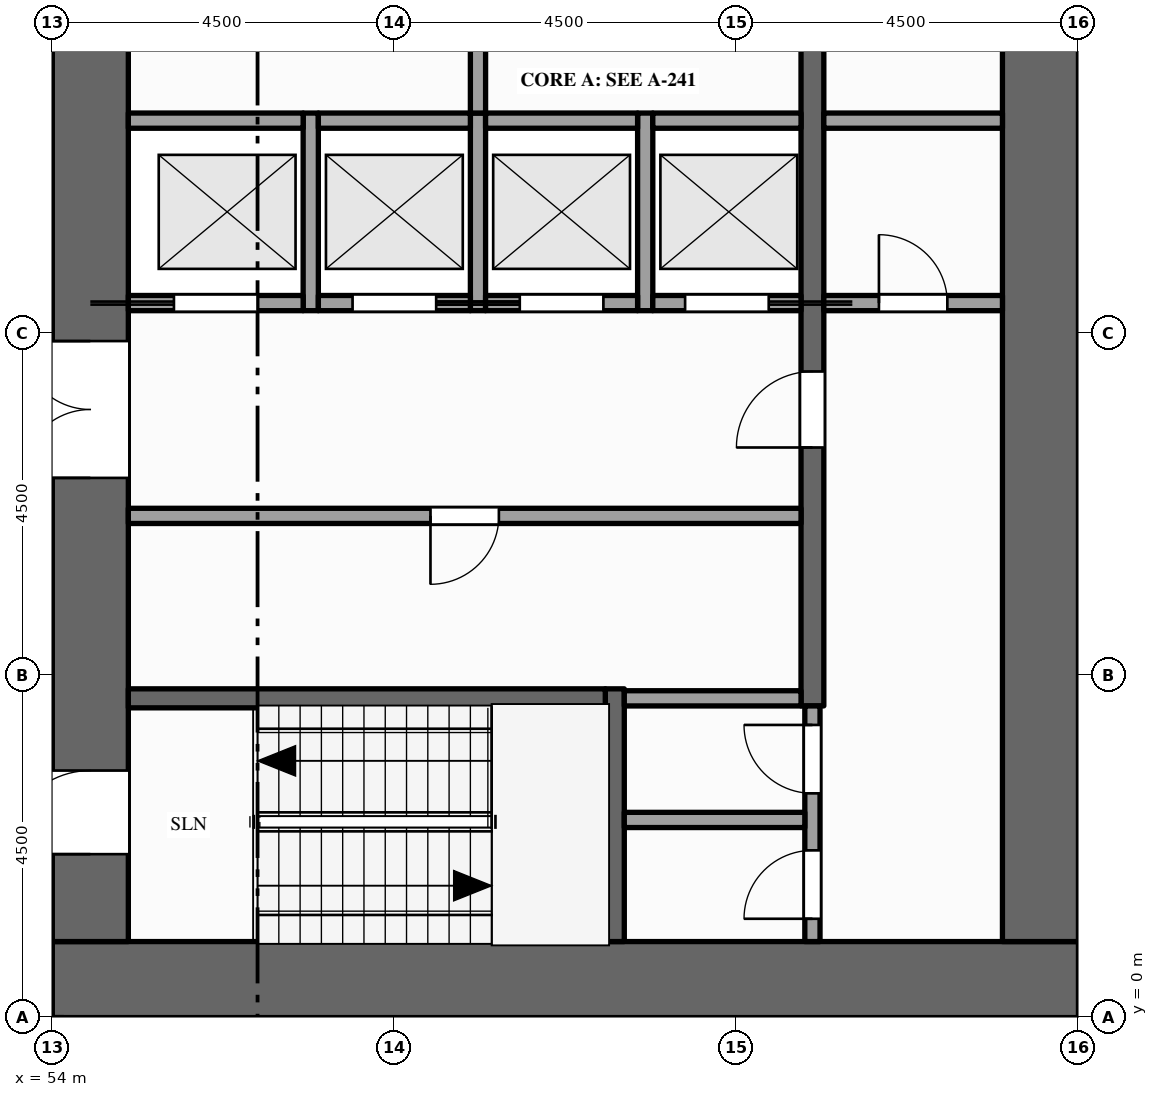
"""IFC4 building model, lengths in metres.
Left out: names, types, materials, properties, quantities, classifications, styles, units other than length and angle.
Written with IfcOpenShell. Run it as: python <this file> out.ifc"""

import sys

from ifc_helpers import new_model, si_unit, direction, frame, frame_2d, origin, place, context, subcontext, project, spatial, rectangle, extrude, element, fill, save


model = new_model("IFC4")
c1 = context("Model", 3, precision=1e-05, world=origin(), true_north=direction((0.0, 1.0)))
c2 = subcontext(c1, "Body", "Model", "MODEL_VIEW")
j1 = project(units=[si_unit("LENGTHUNIT", "METRE"), si_unit("PLANEANGLEUNIT", "RADIAN")], contexts=[c1])
p1 = place(None, origin())
s1 = spatial("IfcSite", under=j1, at=p1, CompositionType="ELEMENT")
p2 = place(p1, origin())
s2 = spatial("IfcBuilding", under=s1, at=p2, CompositionType="ELEMENT")
p3 = place(p2, frame((0.0, 0.0, 227.0)))
s3 = spatial("IfcBuildingStorey", under=s2, at=p3, CompositionType="ELEMENT", Elevation=227.0)
p4 = place(p3, frame((67.5, 0.5, -0.15), z_axis=(0.0, 0.0, 1.0), x_axis=(-1.0, 0.0, 0.0)))
e1 = element("IfcWall", 1, at=p4, inside=s3, PredefinedType="SHEAR", context=c2, shape_type="SweptSolid", body=[
    extrude(rectangle(XDim=13.5, YDim=1.0, at=frame_2d((6.75, 0.0))), origin(), (0.0, 0.0, 1.0), 4.0),
])
p5 = place(p3, frame((54.5, 1.0, -0.15), z_axis=(0.0, 0.0, 1.0), x_axis=(0.0, 1.0, 0.0)))
e2 = element("IfcWall", 2, at=p5, inside=s3, PredefinedType="SHEAR", context=c2, shape_type="SweptSolid", body=[
    extrude(rectangle(XDim=20.5, YDim=1.0, at=frame_2d((10.25, 0.0))), origin(), (0.0, 0.0, 1.0), 4.0),
])
p6 = place(p5, frame((6.1, 0.0, 0.15)))
e3 = element("IfcOpeningElement", 3, at=p6, cuts=e2, PredefinedType="OPENING", context=c2, shape_type="SweptSolid", body=[
    extrude(rectangle(XDim=1.8, YDim=2.1, at=frame_2d((0.9, 1.05))), frame((0.0, 0.51, 0.0), z_axis=(0.0, -1.0, 0.0), x_axis=(1.0, 0.0, 0.0)), (0.0, 0.0, 1.0), 1.02),
])
p7 = place(p5, frame((12.15, 0.0, 0.15)))
e4 = element("IfcOpeningElement", 4, at=p7, cuts=e2, PredefinedType="OPENING", context=c2, shape_type="SweptSolid", body=[
    extrude(rectangle(XDim=1.1, YDim=2.1, at=frame_2d((0.55, 1.05))), frame((0.0, 0.51, 0.0), z_axis=(0.0, -1.0, 0.0), x_axis=(1.0, 0.0, 0.0)), (0.0, 0.0, 1.0), 1.02),
])
p8 = place(p5, frame((1.15, 0.0, 0.15)))
e5 = element("IfcOpeningElement", 5, at=p8, cuts=e2, PredefinedType="OPENING", context=c2, shape_type="SweptSolid", body=[
    extrude(rectangle(XDim=1.1, YDim=2.1, at=frame_2d((0.55, 1.05))), frame((0.0, 0.51, 0.0), z_axis=(0.0, -1.0, 0.0), x_axis=(1.0, 0.0, 0.0)), (0.0, 0.0, 1.0), 1.02),
])
p9 = place(p5, frame((18.35, 0.0, 0.15)))
e6 = element("IfcOpeningElement", 6, at=p9, cuts=e2, PredefinedType="OPENING", context=c2, shape_type="SweptSolid", body=[
    extrude(rectangle(XDim=1.1, YDim=2.1, at=frame_2d((0.55, 1.05))), frame((0.0, 0.51, 0.0), z_axis=(0.0, -1.0, 0.0), x_axis=(1.0, 0.0, 0.0)), (0.0, 0.0, 1.0), 1.02),
])
p10 = place(p3, frame((67.0, 1.0, -0.15), z_axis=(0.0, 0.0, 1.0), x_axis=(0.0, 1.0, 0.0)))
e7 = element("IfcWall", 7, at=p10, inside=s3, PredefinedType="SHEAR", context=c2, shape_type="SweptSolid", body=[
    extrude(rectangle(XDim=20.5, YDim=1.0, at=frame_2d((10.25, 0.0))), origin(), (0.0, 0.0, 1.0), 4.0),
])
for number, where, z_axis, x_axis in (
    (8, (57.4, 9.3, 0.0), (0.0, 0.0, 1.0), (0.0, 1.0, 0.0)),
    (9, (59.6, 9.3, 0.0), (0.0, 0.0, 1.0), (0.0, 1.0, 0.0)),
):
    element("IfcWall", number, at=place(p3, frame(where, z_axis=z_axis, x_axis=x_axis)), inside=s3, PredefinedType="SOLIDWALL", context=c2, shape_type="SweptSolid", body=[
        extrude(rectangle(XDim=2.6, YDim=0.2, at=frame_2d((1.3, 0.0))), origin(), (0.0, 0.0, 1.0), 3.85),
    ])
p11 = place(p3, frame((59.6, 11.9, 0.0), z_axis=(0.0, 0.0, 1.0), x_axis=(0.0, 1.0, 0.0)))
e10 = element("IfcWall", 10, at=p11, inside=s3, PredefinedType="PARTITIONING", context=c2, shape_type="SweptSolid", body=[
    extrude(rectangle(XDim=3.6, YDim=0.2, at=frame_2d((1.8, 0.0))), origin(), (0.0, 0.0, 1.0), 3.85),
])
p12 = place(p11, frame((1.3, 0.0, 0.0)))
e11 = element("IfcOpeningElement", 11, at=p12, cuts=e10, PredefinedType="OPENING", context=c2, shape_type="SweptSolid", body=[
    extrude(rectangle(XDim=1.0, YDim=2.1, at=frame_2d((0.5, 1.05))), frame((0.0, 0.11, 0.0), z_axis=(0.0, -1.0, 0.0), x_axis=(1.0, 0.0, 0.0)), (0.0, 0.0, 1.0), 0.22),
])
p13 = place(p3, frame((61.4, 1.0, 0.0), z_axis=(0.0, 0.0, 1.0), x_axis=(0.0, 1.0, 0.0)))
e12 = element("IfcWall", 12, at=p13, inside=s3, PredefinedType="SHEAR", context=c2, shape_type="SweptSolid", body=[
    extrude(rectangle(XDim=3.325, YDim=0.25, at=frame_2d((1.663, 0.0))), origin(), (0.0, 0.0, 1.0), 3.85),
])
p14 = place(p3, frame((61.8, 9.3, 0.0), z_axis=(0.0, 0.0, 1.0), x_axis=(0.0, 1.0, 0.0)))
e13 = element("IfcWall", 13, at=p14, inside=s3, PredefinedType="SOLIDWALL", context=c2, shape_type="SweptSolid", body=[
    extrude(rectangle(XDim=2.6, YDim=0.2, at=frame_2d((1.3, 0.0))), origin(), (0.0, 0.0, 1.0), 3.85),
])
p15 = place(p3, frame((64.0, 1.0, 0.0), z_axis=(0.0, 0.0, 1.0), x_axis=(0.0, 1.0, 0.0)))
e14 = element("IfcWall", 14, at=p15, inside=s3, PredefinedType="PARTITIONING", context=c2, shape_type="SweptSolid", body=[
    extrude(rectangle(XDim=3.1, YDim=0.2, at=frame_2d((1.55, 0.0))), origin(), (0.0, 0.0, 1.0), 3.85),
])
p16 = place(p15, frame((0.3, 0.0, 0.0)))
e15 = element("IfcOpeningElement", 15, at=p16, cuts=e14, PredefinedType="OPENING", context=c2, shape_type="SweptSolid", body=[
    extrude(rectangle(XDim=0.9, YDim=2.1, at=frame_2d((0.45, 1.05))), frame((0.0, 0.11, 0.0), z_axis=(0.0, -1.0, 0.0), x_axis=(1.0, 0.0, 0.0)), (0.0, 0.0, 1.0), 0.22),
])
p17 = place(p15, frame((1.95, 0.0, 0.0)))
e16 = element("IfcOpeningElement", 16, at=p17, cuts=e14, PredefinedType="OPENING", context=c2, shape_type="SweptSolid", body=[
    extrude(rectangle(XDim=0.9, YDim=2.1, at=frame_2d((0.45, 1.05))), frame((0.0, 0.11, 0.0), z_axis=(0.0, -1.0, 0.0), x_axis=(1.0, 0.0, 0.0)), (0.0, 0.0, 1.0), 0.22),
])
p18 = place(p3, frame((64.0, 4.1, 0.0), z_axis=(0.0, 0.0, 1.0), x_axis=(0.0, 1.0, 0.0)))
e17 = element("IfcWall", 17, at=p18, inside=s3, PredefinedType="SHEAR", context=c2, shape_type="SweptSolid", body=[
    extrude(rectangle(XDim=14.5, YDim=0.3, at=frame_2d((7.25, 0.0))), origin(), (0.0, 0.0, 1.0), 3.85),
])
p19 = place(p18, frame((3.4, 0.0, 0.0)))
e18 = element("IfcOpeningElement", 18, at=p19, cuts=e17, PredefinedType="OPENING", context=c2, shape_type="SweptSolid", body=[
    extrude(rectangle(XDim=1.0, YDim=2.1, at=frame_2d((0.5, 1.05))), frame((0.0, 0.16, 0.0), z_axis=(0.0, -1.0, 0.0), x_axis=(1.0, 0.0, 0.0)), (0.0, 0.0, 1.0), 0.32),
])
p20 = place(p18, frame((9.1, 0.0, 0.0)))
e19 = element("IfcOpeningElement", 19, at=p20, cuts=e17, PredefinedType="OPENING", context=c2, shape_type="SweptSolid", body=[
    extrude(rectangle(XDim=1.0, YDim=2.1, at=frame_2d((0.5, 1.05))), frame((0.0, 0.16, 0.0), z_axis=(0.0, -1.0, 0.0), x_axis=(1.0, 0.0, 0.0)), (0.0, 0.0, 1.0), 0.32),
])
p21 = place(p3, frame((61.525, 2.6, 0.0), z_axis=(0.0, 0.0, 1.0), x_axis=(1.0, 0.0, 0.0)))
e20 = element("IfcWall", 20, at=p21, inside=s3, PredefinedType="PARTITIONING", context=c2, shape_type="SweptSolid", body=[
    extrude(rectangle(XDim=2.375, YDim=0.2, at=frame_2d((1.188, 0.0))), origin(), (0.0, 0.0, 1.0), 3.85),
])
p22 = place(p3, frame((55.0, 4.2, 0.0), z_axis=(0.0, 0.0, 1.0), x_axis=(1.0, 0.0, 0.0)))
e21 = element("IfcWall", 21, at=p22, inside=s3, PredefinedType="SHEAR", context=c2, shape_type="SweptSolid", body=[
    extrude(rectangle(XDim=6.275, YDim=0.25, at=frame_2d((3.137, 0.0))), origin(), (0.0, 0.0, 1.0), 3.85),
])
p23 = place(p3, frame((61.525, 4.2, 0.0), z_axis=(0.0, 0.0, 1.0), x_axis=(1.0, 0.0, 0.0)))
e22 = element("IfcWall", 22, at=p23, inside=s3, PredefinedType="PARTITIONING", context=c2, shape_type="SweptSolid", body=[
    extrude(rectangle(XDim=2.325, YDim=0.2, at=frame_2d((1.163, 0.0))), origin(), (0.0, 0.0, 1.0), 3.85),
])
p24 = place(p3, frame((55.0, 6.6, 0.0), z_axis=(0.0, 0.0, 1.0), x_axis=(1.0, 0.0, 0.0)))
e23 = element("IfcWall", 23, at=p24, inside=s3, PredefinedType="PARTITIONING", context=c2, shape_type="SweptSolid", body=[
    extrude(rectangle(XDim=8.85, YDim=0.2, at=frame_2d((4.425, 0.0))), origin(), (0.0, 0.0, 1.0), 3.85),
])
p25 = place(p24, frame((3.975, 0.0, 0.0)))
e24 = element("IfcOpeningElement", 24, at=p25, cuts=e23, PredefinedType="OPENING", context=c2, shape_type="SweptSolid", body=[
    extrude(rectangle(XDim=0.9, YDim=2.1, at=frame_2d((0.45, 1.05))), frame((0.0, 0.11, 0.0), z_axis=(0.0, -1.0, 0.0), x_axis=(1.0, 0.0, 0.0)), (0.0, 0.0, 1.0), 0.22),
])
p26 = place(p3, frame((55.0, 9.4, 0.0), z_axis=(0.0, 0.0, 1.0), x_axis=(1.0, 0.0, 0.0)))
e25 = element("IfcWall", 25, at=p26, inside=s3, PredefinedType="SOLIDWALL", context=c2, shape_type="SweptSolid", body=[
    extrude(rectangle(XDim=2.3, YDim=0.2, at=frame_2d((1.15, 0.0))), origin(), (0.0, 0.0, 1.0), 3.85),
])
p27 = place(p26, frame((0.6, 0.0, 0.012)))
e26 = element("IfcOpeningElement", 26, at=p27, cuts=e25, PredefinedType="OPENING", context=c2, shape_type="SweptSolid", body=[
    extrude(rectangle(XDim=1.1, YDim=2.1, at=frame_2d((0.55, 1.05))), frame((0.0, 0.11, 0.0), z_axis=(0.0, -1.0, 0.0), x_axis=(1.0, 0.0, 0.0)), (0.0, 0.0, 1.0), 0.22),
])
p28 = place(p3, frame((57.5, 9.4, 0.0), z_axis=(0.0, 0.0, 1.0), x_axis=(1.0, 0.0, 0.0)))
e27 = element("IfcWall", 27, at=p28, inside=s3, PredefinedType="SOLIDWALL", context=c2, shape_type="SweptSolid", body=[
    extrude(rectangle(XDim=2.0, YDim=0.2, at=frame_2d((1.0, 0.0))), origin(), (0.0, 0.0, 1.0), 3.85),
])
p29 = place(p28, frame((0.45, 0.0, 0.012)))
e28 = element("IfcOpeningElement", 28, at=p29, cuts=e27, PredefinedType="OPENING", context=c2, shape_type="SweptSolid", body=[
    extrude(rectangle(XDim=1.1, YDim=2.1, at=frame_2d((0.55, 1.05))), frame((0.0, 0.11, 0.0), z_axis=(0.0, -1.0, 0.0), x_axis=(1.0, 0.0, 0.0)), (0.0, 0.0, 1.0), 0.22),
])
p30 = place(p3, frame((59.7, 9.4, 0.0), z_axis=(0.0, 0.0, 1.0), x_axis=(1.0, 0.0, 0.0)))
e29 = element("IfcWall", 29, at=p30, inside=s3, PredefinedType="SOLIDWALL", context=c2, shape_type="SweptSolid", body=[
    extrude(rectangle(XDim=2.0, YDim=0.2, at=frame_2d((1.0, 0.0))), origin(), (0.0, 0.0, 1.0), 3.85),
])
p31 = place(p30, frame((0.45, 0.0, 0.012)))
e30 = element("IfcOpeningElement", 30, at=p31, cuts=e29, PredefinedType="OPENING", context=c2, shape_type="SweptSolid", body=[
    extrude(rectangle(XDim=1.1, YDim=2.1, at=frame_2d((0.55, 1.05))), frame((0.0, 0.11, 0.0), z_axis=(0.0, -1.0, 0.0), x_axis=(1.0, 0.0, 0.0)), (0.0, 0.0, 1.0), 0.22),
])
p32 = place(p3, frame((61.9, 9.4, 0.0), z_axis=(0.0, 0.0, 1.0), x_axis=(1.0, 0.0, 0.0)))
e31 = element("IfcWall", 31, at=p32, inside=s3, PredefinedType="SOLIDWALL", context=c2, shape_type="SweptSolid", body=[
    extrude(rectangle(XDim=1.95, YDim=0.2, at=frame_2d((0.975, 0.0))), origin(), (0.0, 0.0, 1.0), 3.85),
])
p33 = place(p32, frame((0.425, 0.0, 0.012)))
e32 = element("IfcOpeningElement", 32, at=p33, cuts=e31, PredefinedType="OPENING", context=c2, shape_type="SweptSolid", body=[
    extrude(rectangle(XDim=1.1, YDim=2.1, at=frame_2d((0.55, 1.05))), frame((0.0, 0.11, 0.0), z_axis=(0.0, -1.0, 0.0), x_axis=(1.0, 0.0, 0.0)), (0.0, 0.0, 1.0), 0.22),
])
p34 = place(p3, frame((64.15, 9.4, 0.0), z_axis=(0.0, 0.0, 1.0), x_axis=(1.0, 0.0, 0.0)))
e33 = element("IfcWall", 33, at=p34, inside=s3, PredefinedType="PARTITIONING", context=c2, shape_type="SweptSolid", body=[
    extrude(rectangle(XDim=2.35, YDim=0.2, at=frame_2d((1.175, 0.0))), origin(), (0.0, 0.0, 1.0), 3.85),
])
p35 = place(p34, frame((0.725, 0.0, 0.0)))
e34 = element("IfcOpeningElement", 34, at=p35, cuts=e33, PredefinedType="OPENING", context=c2, shape_type="SweptSolid", body=[
    extrude(rectangle(XDim=0.9, YDim=2.1, at=frame_2d((0.45, 1.05))), frame((0.0, 0.11, 0.0), z_axis=(0.0, -1.0, 0.0), x_axis=(1.0, 0.0, 0.0)), (0.0, 0.0, 1.0), 0.22),
])
p36 = place(p3, frame((55.0, 11.8, 0.0), z_axis=(0.0, 0.0, 1.0), x_axis=(1.0, 0.0, 0.0)))
e35 = element("IfcWall", 35, at=p36, inside=s3, PredefinedType="SOLIDWALL", context=c2, shape_type="SweptSolid", body=[
    extrude(rectangle(XDim=2.3, YDim=0.2, at=frame_2d((1.15, 0.0))), origin(), (0.0, 0.0, 1.0), 3.85),
])
for number, where, z_axis, x_axis in (
    (36, (57.5, 11.8, 0.0), (0.0, 0.0, 1.0), (1.0, 0.0, 0.0)),
    (37, (59.7, 11.8, 0.0), (0.0, 0.0, 1.0), (1.0, 0.0, 0.0)),
):
    element("IfcWall", number, at=place(p3, frame(where, z_axis=z_axis, x_axis=x_axis)), inside=s3, PredefinedType="SOLIDWALL", context=c2, shape_type="SweptSolid", body=[
        extrude(rectangle(XDim=2.0, YDim=0.2, at=frame_2d((1.0, 0.0))), origin(), (0.0, 0.0, 1.0), 3.85),
    ])
p37 = place(p3, frame((61.9, 11.8, 0.0), z_axis=(0.0, 0.0, 1.0), x_axis=(1.0, 0.0, 0.0)))
e38 = element("IfcWall", 38, at=p37, inside=s3, PredefinedType="SOLIDWALL", context=c2, shape_type="SweptSolid", body=[
    extrude(rectangle(XDim=1.95, YDim=0.2, at=frame_2d((0.975, 0.0))), origin(), (0.0, 0.0, 1.0), 3.85),
])
p38 = place(p3, frame((64.15, 11.8, 0.0), z_axis=(0.0, 0.0, 1.0), x_axis=(1.0, 0.0, 0.0)))
e39 = element("IfcWall", 39, at=p38, inside=s3, PredefinedType="PARTITIONING", context=c2, shape_type="SweptSolid", body=[
    extrude(rectangle(XDim=2.35, YDim=0.2, at=frame_2d((1.175, 0.0))), origin(), (0.0, 0.0, 1.0), 3.85),
])
p39 = place(p27, origin())
e40 = element("IfcDoor", 40, at=p39, inside=s3, OperationType="SLIDING_TO_LEFT", PredefinedType="DOOR", context=c2, shape_type="SweptSolid", body=[
    extrude(rectangle(XDim=1.1, YDim=2.1, at=frame_2d((0.55, 1.05))), frame((0.0, 0.025, 0.0), z_axis=(0.0, -1.0, 0.0), x_axis=(1.0, 0.0, 0.0)), (0.0, 0.0, 1.0), 0.05),
])
fill(e26, e40)
p40 = place(p29, origin())
e41 = element("IfcDoor", 41, at=p40, inside=s3, OperationType="SLIDING_TO_RIGHT", PredefinedType="DOOR", context=c2, shape_type="SweptSolid", body=[
    extrude(rectangle(XDim=1.1, YDim=2.1, at=frame_2d((0.55, 1.05))), frame((0.0, 0.025, 0.0), z_axis=(0.0, -1.0, 0.0), x_axis=(1.0, 0.0, 0.0)), (0.0, 0.0, 1.0), 0.05),
])
fill(e28, e41)
p41 = place(p31, origin())
e42 = element("IfcDoor", 42, at=p41, inside=s3, OperationType="SLIDING_TO_LEFT", PredefinedType="DOOR", context=c2, shape_type="SweptSolid", body=[
    extrude(rectangle(XDim=1.1, YDim=2.1, at=frame_2d((0.55, 1.05))), frame((0.0, 0.025, 0.0), z_axis=(0.0, -1.0, 0.0), x_axis=(1.0, 0.0, 0.0)), (0.0, 0.0, 1.0), 0.05),
])
fill(e30, e42)
p42 = place(p33, origin())
e43 = element("IfcDoor", 43, at=p42, inside=s3, OperationType="SLIDING_TO_RIGHT", PredefinedType="DOOR", context=c2, shape_type="SweptSolid", body=[
    extrude(rectangle(XDim=1.1, YDim=2.1, at=frame_2d((0.55, 1.05))), frame((0.0, 0.025, 0.0), z_axis=(0.0, -1.0, 0.0), x_axis=(1.0, 0.0, 0.0)), (0.0, 0.0, 1.0), 0.05),
])
fill(e32, e43)
p43 = place(p6, origin())
e44 = element("IfcDoor", 44, at=p43, inside=s3, OperationType="DOUBLE_DOOR_SINGLE_SWING", PredefinedType="DOOR", context=c2, shape_type="SweptSolid", body=[
    extrude(rectangle(XDim=1.8, YDim=2.1, at=frame_2d((0.9, 1.05))), frame((0.0, 0.025, 0.0), z_axis=(0.0, -1.0, 0.0), x_axis=(1.0, 0.0, 0.0)), (0.0, 0.0, 1.0), 0.05),
])
fill(e3, e44)
p44 = place(p19, origin())
e45 = element("IfcDoor", 45, at=p44, inside=s3, OperationType="SINGLE_SWING_LEFT", PredefinedType="DOOR", context=c2, shape_type="SweptSolid", body=[
    extrude(rectangle(XDim=1.0, YDim=2.1, at=frame_2d((0.5, 1.05))), frame((0.0, 0.025, 0.0), z_axis=(0.0, -1.0, 0.0), x_axis=(1.0, 0.0, 0.0)), (0.0, 0.0, 1.0), 0.05),
])
fill(e18, e45)
p45 = place(p35, origin())
e46 = element("IfcDoor", 46, at=p45, inside=s3, OperationType="SINGLE_SWING_LEFT", PredefinedType="DOOR", context=c2, shape_type="SweptSolid", body=[
    extrude(rectangle(XDim=0.9, YDim=2.1, at=frame_2d((0.45, 1.05))), frame((0.0, 0.025, 0.0), z_axis=(0.0, -1.0, 0.0), x_axis=(1.0, 0.0, 0.0)), (0.0, 0.0, 1.0), 0.05),
])
fill(e34, e46)
p46 = place(p8, origin())
e47 = element("IfcDoor", 47, at=p46, inside=s3, OperationType="SINGLE_SWING_LEFT", PredefinedType="DOOR", context=c2, shape_type="SweptSolid", body=[
    extrude(rectangle(XDim=1.1, YDim=2.1, at=frame_2d((0.55, 1.05))), frame((0.0, 0.025, 0.0), z_axis=(0.0, -1.0, 0.0), x_axis=(1.0, 0.0, 0.0)), (0.0, 0.0, 1.0), 0.05),
])
fill(e5, e47)
p47 = place(p16, origin())
e48 = element("IfcDoor", 48, at=p47, inside=s3, OperationType="SINGLE_SWING_LEFT", PredefinedType="DOOR", context=c2, shape_type="SweptSolid", body=[
    extrude(rectangle(XDim=0.9, YDim=2.1, at=frame_2d((0.45, 1.05))), frame((0.0, 0.025, 0.0), z_axis=(0.0, -1.0, 0.0), x_axis=(1.0, 0.0, 0.0)), (0.0, 0.0, 1.0), 0.05),
])
fill(e15, e48)
p48 = place(p17, origin())
e49 = element("IfcDoor", 49, at=p48, inside=s3, OperationType="SINGLE_SWING_RIGHT", PredefinedType="DOOR", context=c2, shape_type="SweptSolid", body=[
    extrude(rectangle(XDim=0.9, YDim=2.1, at=frame_2d((0.45, 1.05))), frame((0.0, 0.025, 0.0), z_axis=(0.0, -1.0, 0.0), x_axis=(1.0, 0.0, 0.0)), (0.0, 0.0, 1.0), 0.05),
])
fill(e16, e49)
p49 = place(p25, origin())
e50 = element("IfcDoor", 50, at=p49, inside=s3, OperationType="SINGLE_SWING_LEFT", PredefinedType="DOOR", context=c2, shape_type="SweptSolid", body=[
    extrude(rectangle(XDim=0.9, YDim=2.1, at=frame_2d((0.45, 1.05))), frame((0.0, 0.025, 0.0), z_axis=(0.0, -1.0, 0.0), x_axis=(1.0, 0.0, 0.0)), (0.0, 0.0, 1.0), 0.05),
])
fill(e24, e50)
save(model, sys.argv[1])
